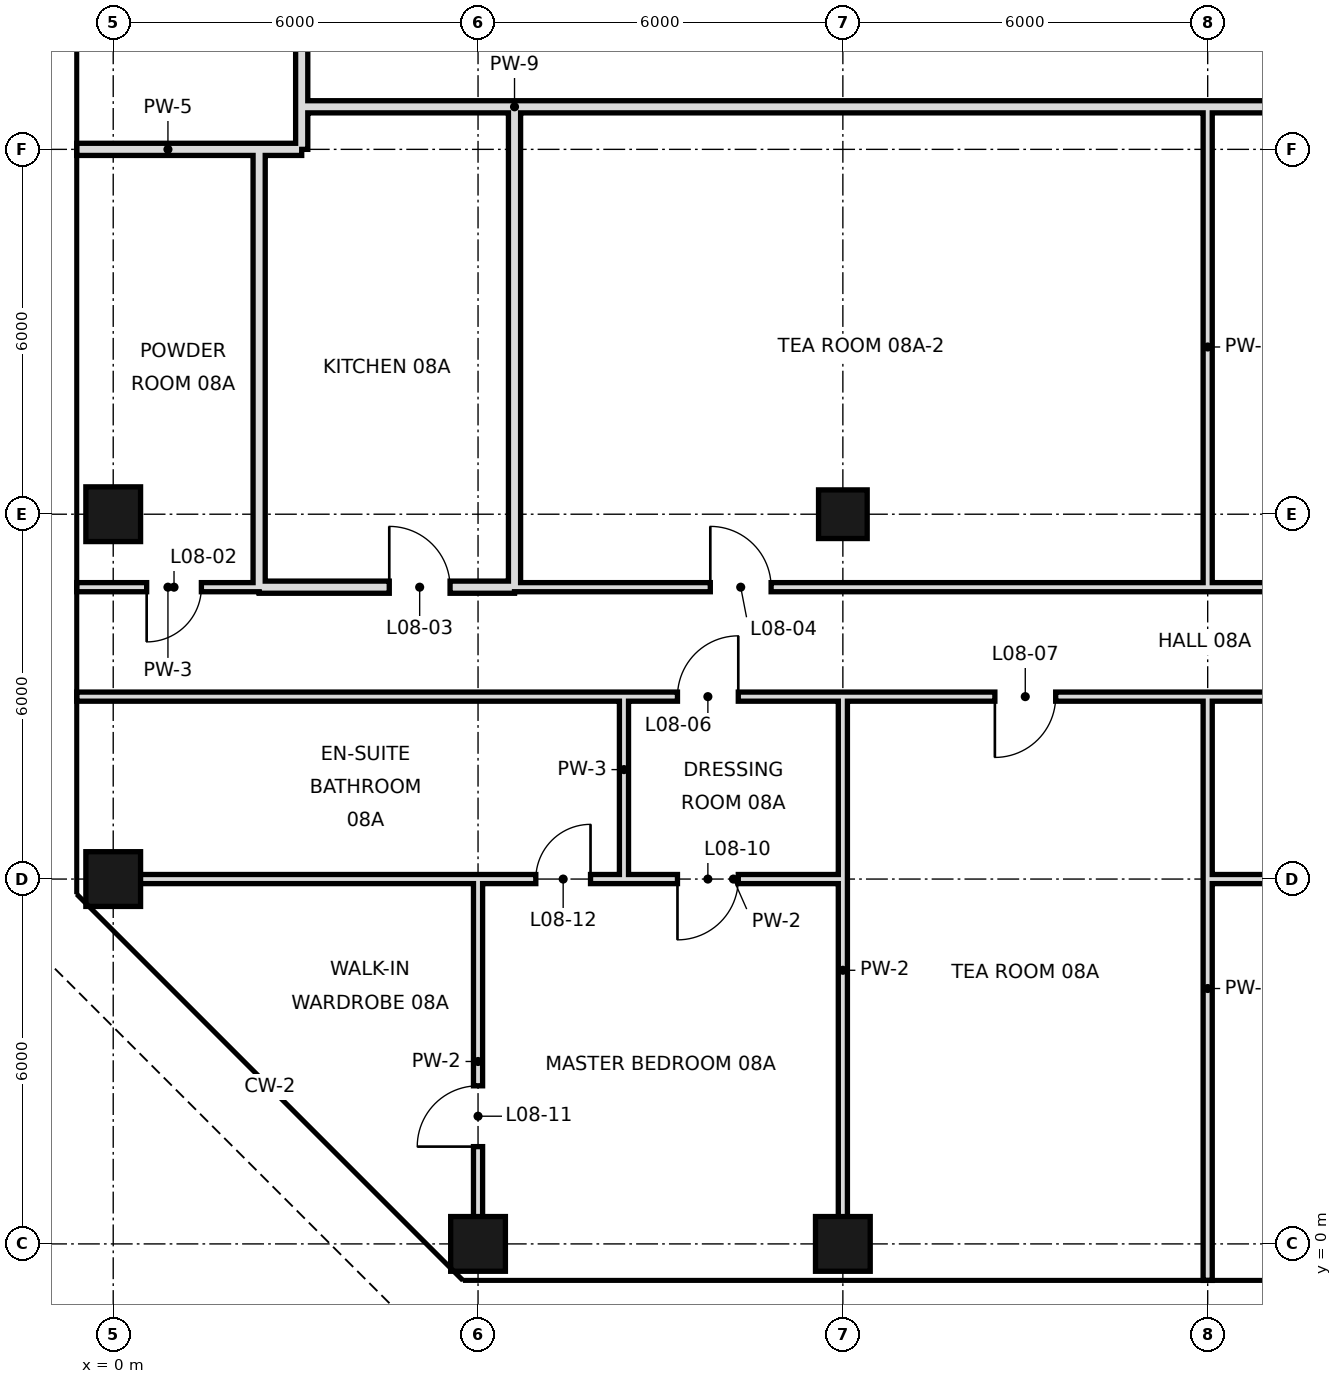
"""IFC4 building model, lengths in metres.
Left out: names, types, materials, properties, quantities, classifications, styles, units other than length and angle.
Written with IfcOpenShell. Run it as: python <this file> out.ifc"""

import sys

from ifc_helpers import new_model, si_unit, direction, frame, frame_2d, origin, origin_2d, place, context, subcontext, project, spatial, rectangle, hollow_rectangle, extrude, element, fill, save


model = new_model("IFC4")
c1 = context("Model", 3, precision=1e-05, world=origin(), true_north=direction((0.0, 1.0)))
c2 = subcontext(c1, "Body", "Model", "MODEL_VIEW")
j1 = project(units=[si_unit("LENGTHUNIT", "METRE"), si_unit("PLANEANGLEUNIT", "RADIAN")], contexts=[c1])
p1 = place(None, origin())
s1 = spatial("IfcSite", under=j1, at=p1, CompositionType="ELEMENT")
p2 = place(p1, origin())
s2 = spatial("IfcBuilding", under=s1, at=p2, CompositionType="ELEMENT")
p3 = place(p2, frame((0.0, 0.0, 49.8)))
s3 = spatial("IfcBuildingStorey", under=s2, at=p3, CompositionType="ELEMENT", Elevation=49.8)
for number, where, z_axis, x_axis in (
    (1, (0.0, 6.0, 0.0), (0.0, 0.0, 1.0), (1.0, 0.0, 0.0)),
    (2, (0.0, 12.0, 0.0), (0.0, 0.0, 1.0), (1.0, 0.0, 0.0)),
    (3, (6.0, 0.0, 0.0), (0.0, 0.0, 1.0), (1.0, 0.0, 0.0)),
    (4, (12.0, 0.0, 0.0), (0.0, 0.0, 1.0), (1.0, 0.0, 0.0)),
):
    element("IfcColumn", number, at=place(p3, frame(where, z_axis=z_axis, x_axis=x_axis)), inside=s3, PredefinedType="COLUMN", context=c2, shape_type="SweptSolid", body=[
        extrude(hollow_rectangle(XDim=0.9, YDim=0.9, WallThickness=0.045, at=origin_2d()), origin(), (0.0, 0.0, 1.0), 3.6),
    ])
p4 = place(p3, frame((12.0, 12.0, 0.0), z_axis=(0.0, 0.0, 1.0), x_axis=(1.0, 0.0, 0.0)))
e5 = element("IfcColumn", 5, at=p4, inside=s3, PredefinedType="COLUMN", context=c2, shape_type="SweptSolid", body=[
    extrude(hollow_rectangle(XDim=0.8, YDim=0.8, WallThickness=0.04, at=origin_2d()), origin(), (0.0, 0.0, 1.0), 3.6),
])
p5 = place(p3, frame((12.0, 0.0, 0.0), z_axis=(0.0, 0.0, 1.0), x_axis=(0.0, 1.0, 0.0)))
e6 = element("IfcWall", 6, at=p5, inside=s3, PredefinedType="PARTITIONING", context=c2, shape_type="SweptSolid", body=[
    extrude(rectangle(XDim=9.0, YDim=0.15, at=frame_2d((4.5, 0.0))), origin(), (0.0, 0.0, 1.0), 2.72),
])
p6 = place(p3, frame((18.0, -0.6, 0.0), z_axis=(0.0, 0.0, 1.0), x_axis=(0.0, 1.0, 0.0)))
e7 = element("IfcWall", 7, at=p6, inside=s3, PredefinedType="PARTITIONING", context=c2, shape_type="SweptSolid", body=[
    extrude(rectangle(XDim=9.6, YDim=0.15, at=frame_2d((4.8, 0.0))), origin(), (0.0, 0.0, 1.0), 2.72),
])
p7 = place(p3, frame((18.0, 10.8, 0.0), z_axis=(0.0, 0.0, 1.0), x_axis=(0.0, 1.0, 0.0)))
e8 = element("IfcWall", 8, at=p7, inside=s3, PredefinedType="PARTITIONING", context=c2, shape_type="SweptSolid", body=[
    extrude(rectangle(XDim=7.9, YDim=0.15, at=frame_2d((3.95, 0.0))), origin(), (0.0, 0.0, 1.0), 2.72),
])
p8 = place(p3, frame((2.4, 10.8, 0.0), z_axis=(0.0, 0.0, 1.0), x_axis=(0.0, 1.0, 0.0)))
e9 = element("IfcWall", 9, at=p8, inside=s3, PredefinedType="SOLIDWALL", context=c2, shape_type="SweptSolid", body=[
    extrude(rectangle(XDim=7.2, YDim=0.2, at=frame_2d((3.6, 0.0))), origin(), (0.0, 0.0, 1.0), 2.72),
])
p9 = place(p3, frame((3.1, 18.7, 0.0), z_axis=(0.0, 0.0, 1.0), x_axis=(0.0, 1.0, 0.0)))
e10 = element("IfcWall", 10, at=p9, inside=s3, PredefinedType="SOLIDWALL", context=c2, shape_type="SweptSolid", body=[
    extrude(rectangle(XDim=27.249, YDim=0.2, at=frame_2d((13.625, 0.0))), origin(), (0.0, 0.0, 1.0), 2.97),
])
p10 = place(p9, frame((17.54, 0.0, 0.0)))
e11 = element("IfcOpeningElement", 11, at=p10, cuts=e10, PredefinedType="OPENING", context=c2, shape_type="SweptSolid", body=[
    extrude(rectangle(XDim=1.2, YDim=2.4, at=frame_2d((0.6, 1.2))), frame((0.0, 0.11, 0.0), z_axis=(0.0, -1.0, 0.0), x_axis=(1.0, 0.0, 0.0)), (0.0, 0.0, 1.0), 0.22),
])
p11 = place(p3, frame((3.1, 18.0, 0.0), z_axis=(0.0, 0.0, 1.0), x_axis=(0.0, 1.0, 0.0)))
e12 = element("IfcWall", 12, at=p11, inside=s3, PredefinedType="SOLIDWALL", context=c2, shape_type="SweptSolid", body=[
    extrude(rectangle(XDim=0.7, YDim=0.2, at=frame_2d((0.35, 0.0))), origin(), (0.0, 0.0, 1.0), 2.97),
])
p12 = place(p3, frame((6.0, 0.0, 0.0), z_axis=(0.0, 0.0, 1.0), x_axis=(0.0, 1.0, 0.0)))
e13 = element("IfcWall", 13, at=p12, inside=s3, PredefinedType="PARTITIONING", context=c2, shape_type="SweptSolid", body=[
    extrude(rectangle(XDim=6.0, YDim=0.15, at=frame_2d((3.0, 0.0))), origin(), (0.0, 0.0, 1.0), 2.72),
])
p13 = place(p12, frame((1.6, 0.0, 0.0)))
e14 = element("IfcOpeningElement", 14, at=p13, cuts=e13, PredefinedType="OPENING", context=c2, shape_type="SweptSolid", body=[
    extrude(rectangle(XDim=1.0, YDim=2.4, at=frame_2d((0.5, 1.2))), frame((0.0, 0.085, 0.0), z_axis=(0.0, -1.0, 0.0), x_axis=(1.0, 0.0, 0.0)), (0.0, 0.0, 1.0), 0.17),
])
p14 = place(p3, frame((6.6, 10.8, 0.0), z_axis=(0.0, 0.0, 1.0), x_axis=(0.0, 1.0, 0.0)))
e15 = element("IfcWall", 15, at=p14, inside=s3, PredefinedType="SOLIDWALL", context=c2, shape_type="SweptSolid", body=[
    extrude(rectangle(XDim=7.9, YDim=0.2, at=frame_2d((3.95, 0.0))), origin(), (0.0, 0.0, 1.0), 2.72),
])
p15 = place(p3, frame((8.4, 6.0, 0.0), z_axis=(0.0, 0.0, 1.0), x_axis=(0.0, 1.0, 0.0)))
e16 = element("IfcWall", 16, at=p15, inside=s3, PredefinedType="PARTITIONING", context=c2, shape_type="SweptSolid", body=[
    extrude(rectangle(XDim=3.0, YDim=0.15, at=frame_2d((1.5, 0.0))), origin(), (0.0, 0.0, 1.0), 3.42),
])
p16 = place(p3, frame((2.4, 10.8, 0.0), z_axis=(0.0, 0.0, 1.0), x_axis=(1.0, 0.0, 0.0)))
e17 = element("IfcWall", 17, at=p16, inside=s3, PredefinedType="SOLIDWALL", context=c2, shape_type="SweptSolid", body=[
    extrude(rectangle(XDim=4.2, YDim=0.2, at=frame_2d((2.1, 0.0))), origin(), (0.0, 0.0, 1.0), 2.72),
])
p17 = place(p16, frame((2.14, 0.0, 0.0)))
e18 = element("IfcOpeningElement", 18, at=p17, cuts=e17, PredefinedType="OPENING", context=c2, shape_type="SweptSolid", body=[
    extrude(rectangle(XDim=1.0, YDim=2.4, at=frame_2d((0.5, 1.2))), frame((0.0, 0.11, 0.0), z_axis=(0.0, -1.0, 0.0), x_axis=(1.0, 0.0, 0.0)), (0.0, 0.0, 1.0), 0.22),
])
p18 = place(p3, frame((6.6, 10.8, 0.0), z_axis=(0.0, 0.0, 1.0), x_axis=(1.0, 0.0, 0.0)))
e19 = element("IfcWall", 19, at=p18, inside=s3, PredefinedType="PARTITIONING", context=c2, shape_type="SweptSolid", body=[
    extrude(rectangle(XDim=29.4, YDim=0.15, at=frame_2d((14.7, 0.0))), origin(), (0.0, 0.0, 1.0), 3.42),
])
p19 = place(p18, frame((26.8, 0.0, 0.0)))
e20 = element("IfcOpeningElement", 20, at=p19, cuts=e19, PredefinedType="OPENING", context=c2, shape_type="SweptSolid", body=[
    extrude(rectangle(XDim=1.0, YDim=2.4, at=frame_2d((0.5, 1.2))), frame((0.0, 0.085, 0.0), z_axis=(0.0, -1.0, 0.0), x_axis=(1.0, 0.0, 0.0)), (0.0, 0.0, 1.0), 0.17),
])
p20 = place(p18, frame((3.22, 0.0, 0.0)))
e21 = element("IfcOpeningElement", 21, at=p20, cuts=e19, PredefinedType="OPENING", context=c2, shape_type="SweptSolid", body=[
    extrude(rectangle(XDim=1.0, YDim=2.4, at=frame_2d((0.5, 1.2))), frame((0.0, 0.085, 0.0), z_axis=(0.0, -1.0, 0.0), x_axis=(1.0, 0.0, 0.0)), (0.0, 0.0, 1.0), 0.17),
])
p21 = place(p18, frame((14.8, 0.0, 0.0)))
e22 = element("IfcOpeningElement", 22, at=p21, cuts=e19, PredefinedType="OPENING", context=c2, shape_type="SweptSolid", body=[
    extrude(rectangle(XDim=1.0, YDim=2.4, at=frame_2d((0.5, 1.2))), frame((0.0, 0.085, 0.0), z_axis=(0.0, -1.0, 0.0), x_axis=(1.0, 0.0, 0.0)), (0.0, 0.0, 1.0), 0.17),
])
p22 = place(p3, frame((-0.6, 10.8, 0.0), z_axis=(0.0, 0.0, 1.0), x_axis=(1.0, 0.0, 0.0)))
e23 = element("IfcWall", 23, at=p22, inside=s3, PredefinedType="PARTITIONING", context=c2, shape_type="SweptSolid", body=[
    extrude(rectangle(XDim=3.0, YDim=0.15, at=frame_2d((1.5, 0.0))), origin(), (0.0, 0.0, 1.0), 3.42),
])
p23 = place(p22, frame((1.15, 0.0, 0.0)))
e24 = element("IfcOpeningElement", 24, at=p23, cuts=e23, PredefinedType="OPENING", context=c2, shape_type="SweptSolid", body=[
    extrude(rectangle(XDim=0.9, YDim=2.4, at=frame_2d((0.45, 1.2))), frame((0.0, 0.085, 0.0), z_axis=(0.0, -1.0, 0.0), x_axis=(1.0, 0.0, 0.0)), (0.0, 0.0, 1.0), 0.17),
])
p24 = place(p3, frame((-0.6, 18.0, 0.0), z_axis=(0.0, 0.0, 1.0), x_axis=(1.0, 0.0, 0.0)))
e25 = element("IfcWall", 25, at=p24, inside=s3, PredefinedType="SOLIDWALL", context=c2, shape_type="SweptSolid", body=[
    extrude(rectangle(XDim=3.0, YDim=0.2, at=frame_2d((1.5, 0.0))), origin(), (0.0, 0.0, 1.0), 2.72),
])
p25 = place(p3, frame((2.4, 18.0, 0.0), z_axis=(0.0, 0.0, 1.0), x_axis=(1.0, 0.0, 0.0)))
e26 = element("IfcWall", 26, at=p25, inside=s3, PredefinedType="SOLIDWALL", context=c2, shape_type="SweptSolid", body=[
    extrude(rectangle(XDim=0.7, YDim=0.2, at=frame_2d((0.35, 0.0))), origin(), (0.0, 0.0, 1.0), 2.97),
])
p26 = place(p3, frame((6.6, 18.7, 0.0), z_axis=(0.0, 0.0, 1.0), x_axis=(1.0, 0.0, 0.0)))
e27 = element("IfcWall", 27, at=p26, inside=s3, PredefinedType="SOLIDWALL", context=c2, shape_type="SweptSolid", body=[
    extrude(rectangle(XDim=38.3, YDim=0.2, at=frame_2d((19.15, 0.0))), origin(), (0.0, 0.0, 1.0), 2.72),
])
p27 = place(p26, frame((25.8, 0.0, 0.0)))
e28 = element("IfcOpeningElement", 28, at=p27, cuts=e27, PredefinedType="OPENING", context=c2, shape_type="SweptSolid", body=[
    extrude(rectangle(XDim=1.2, YDim=2.4, at=frame_2d((0.6, 1.2))), frame((0.0, 0.11, 0.0), z_axis=(0.0, -1.0, 0.0), x_axis=(1.0, 0.0, 0.0)), (0.0, 0.0, 1.0), 0.22),
])
p28 = place(p26, frame((33.34, 0.0, 0.0)))
e29 = element("IfcOpeningElement", 29, at=p28, cuts=e27, PredefinedType="OPENING", context=c2, shape_type="SweptSolid", body=[
    extrude(rectangle(XDim=1.2, YDim=2.4, at=frame_2d((0.6, 1.2))), frame((0.0, 0.11, 0.0), z_axis=(0.0, -1.0, 0.0), x_axis=(1.0, 0.0, 0.0)), (0.0, 0.0, 1.0), 0.22),
])
p29 = place(p3, frame((3.1, 18.7, 0.0), z_axis=(0.0, 0.0, 1.0), x_axis=(1.0, 0.0, 0.0)))
e30 = element("IfcWall", 30, at=p29, inside=s3, PredefinedType="SOLIDWALL", context=c2, shape_type="SweptSolid", body=[
    extrude(rectangle(XDim=3.5, YDim=0.2, at=frame_2d((1.75, 0.0))), origin(), (0.0, 0.0, 1.0), 2.72),
])
p30 = place(p3, frame((8.4, 6.0, 0.0), z_axis=(0.0, 0.0, 1.0), x_axis=(1.0, 0.0, 0.0)))
e31 = element("IfcWall", 31, at=p30, inside=s3, PredefinedType="PARTITIONING", context=c2, shape_type="SweptSolid", body=[
    extrude(rectangle(XDim=3.6, YDim=0.15, at=frame_2d((1.8, 0.0))), origin(), (0.0, 0.0, 1.0), 2.97),
])
p31 = place(p30, frame((0.88, 0.0, 0.0)))
e32 = element("IfcOpeningElement", 32, at=p31, cuts=e31, PredefinedType="OPENING", context=c2, shape_type="SweptSolid", body=[
    extrude(rectangle(XDim=1.0, YDim=2.4, at=frame_2d((0.5, 1.2))), frame((0.0, 0.085, 0.0), z_axis=(0.0, -1.0, 0.0), x_axis=(1.0, 0.0, 0.0)), (0.0, 0.0, 1.0), 0.17),
])
p32 = place(p3, frame((18.0, 6.0, 0.0), z_axis=(0.0, 0.0, 1.0), x_axis=(1.0, 0.0, 0.0)))
e33 = element("IfcWall", 33, at=p32, inside=s3, PredefinedType="PARTITIONING", context=c2, shape_type="SweptSolid", body=[
    extrude(rectangle(XDim=12.0, YDim=0.15, at=frame_2d((6.0, 0.0))), origin(), (0.0, 0.0, 1.0), 2.97),
])
p33 = place(p32, frame((9.95, 0.0, 0.0)))
e34 = element("IfcOpeningElement", 34, at=p33, cuts=e33, PredefinedType="OPENING", context=c2, shape_type="SweptSolid", body=[
    extrude(rectangle(XDim=1.8, YDim=2.4, at=frame_2d((0.9, 1.2))), frame((0.0, 0.085, 0.0), z_axis=(0.0, -1.0, 0.0), x_axis=(1.0, 0.0, 0.0)), (0.0, 0.0, 1.0), 0.17),
])
p34 = place(p3, frame((0.0, 6.0, 0.0), z_axis=(0.0, 0.0, 1.0), x_axis=(1.0, 0.0, 0.0)))
e35 = element("IfcWall", 35, at=p34, inside=s3, PredefinedType="PARTITIONING", context=c2, shape_type="SweptSolid", body=[
    extrude(rectangle(XDim=8.4, YDim=0.15, at=frame_2d((4.2, 0.0))), origin(), (0.0, 0.0, 1.0), 2.97),
])
p35 = place(p34, frame((6.95, 0.0, 0.0)))
e36 = element("IfcOpeningElement", 36, at=p35, cuts=e35, PredefinedType="OPENING", context=c2, shape_type="SweptSolid", body=[
    extrude(rectangle(XDim=0.9, YDim=2.4, at=frame_2d((0.45, 1.2))), frame((0.0, 0.085, 0.0), z_axis=(0.0, -1.0, 0.0), x_axis=(1.0, 0.0, 0.0)), (0.0, 0.0, 1.0), 0.17),
])
p36 = place(p3, frame((8.4, 9.0, 0.0), z_axis=(0.0, 0.0, 1.0), x_axis=(1.0, 0.0, 0.0)))
e37 = element("IfcWall", 37, at=p36, inside=s3, PredefinedType="PARTITIONING", context=c2, shape_type="SweptSolid", body=[
    extrude(rectangle(XDim=36.0, YDim=0.15, at=frame_2d((18.0, 0.0))), origin(), (0.0, 0.0, 1.0), 3.42),
])
p37 = place(p36, frame((0.88, 0.0, 0.0)))
e38 = element("IfcOpeningElement", 38, at=p37, cuts=e37, PredefinedType="OPENING", context=c2, shape_type="SweptSolid", body=[
    extrude(rectangle(XDim=1.0, YDim=2.4, at=frame_2d((0.5, 1.2))), frame((0.0, 0.085, 0.0), z_axis=(0.0, -1.0, 0.0), x_axis=(1.0, 0.0, 0.0)), (0.0, 0.0, 1.0), 0.17),
])
p38 = place(p36, frame((6.1, 0.0, 0.0)))
e39 = element("IfcOpeningElement", 39, at=p38, cuts=e37, PredefinedType="OPENING", context=c2, shape_type="SweptSolid", body=[
    extrude(rectangle(XDim=1.0, YDim=2.4, at=frame_2d((0.5, 1.2))), frame((0.0, 0.085, 0.0), z_axis=(0.0, -1.0, 0.0), x_axis=(1.0, 0.0, 0.0)), (0.0, 0.0, 1.0), 0.17),
])
p39 = place(p36, frame((16.64, 0.0, 0.0)))
e40 = element("IfcOpeningElement", 40, at=p39, cuts=e37, PredefinedType="OPENING", context=c2, shape_type="SweptSolid", body=[
    extrude(rectangle(XDim=1.8, YDim=2.4, at=frame_2d((0.9, 1.2))), frame((0.0, 0.085, 0.0), z_axis=(0.0, -1.0, 0.0), x_axis=(1.0, 0.0, 0.0)), (0.0, 0.0, 1.0), 0.17),
])
p40 = place(p36, frame((23.7, 0.0, 0.0)))
e41 = element("IfcOpeningElement", 41, at=p40, cuts=e37, PredefinedType="OPENING", context=c2, shape_type="SweptSolid", body=[
    extrude(rectangle(XDim=1.8, YDim=2.4, at=frame_2d((0.9, 1.2))), frame((0.0, 0.085, 0.0), z_axis=(0.0, -1.0, 0.0), x_axis=(1.0, 0.0, 0.0)), (0.0, 0.0, 1.0), 0.17),
])
p41 = place(p36, frame((30.1, 0.0, 0.0)))
e42 = element("IfcOpeningElement", 42, at=p41, cuts=e37, PredefinedType="OPENING", context=c2, shape_type="SweptSolid", body=[
    extrude(rectangle(XDim=1.0, YDim=2.4, at=frame_2d((0.5, 1.2))), frame((0.0, 0.085, 0.0), z_axis=(0.0, -1.0, 0.0), x_axis=(1.0, 0.0, 0.0)), (0.0, 0.0, 1.0), 0.17),
])
p42 = place(p36, frame((34.12, 0.0, 0.0)))
e43 = element("IfcOpeningElement", 43, at=p42, cuts=e37, PredefinedType="OPENING", context=c2, shape_type="SweptSolid", body=[
    extrude(rectangle(XDim=1.0, YDim=2.4, at=frame_2d((0.5, 1.2))), frame((0.0, 0.085, 0.0), z_axis=(0.0, -1.0, 0.0), x_axis=(1.0, 0.0, 0.0)), (0.0, 0.0, 1.0), 0.17),
])
p43 = place(p3, frame((-0.6, 9.0, 0.0), z_axis=(0.0, 0.0, 1.0), x_axis=(1.0, 0.0, 0.0)))
e44 = element("IfcWall", 44, at=p43, inside=s3, PredefinedType="PARTITIONING", context=c2, shape_type="SweptSolid", body=[
    extrude(rectangle(XDim=9.0, YDim=0.15, at=frame_2d((4.5, 0.0))), origin(), (0.0, 0.0, 1.0), 3.42),
])
p44 = place(p23, frame((0.9, 0.0, 0.0), z_axis=(0.0, 0.0, 1.0), x_axis=(-1.0, 0.0, 0.0)))
e45 = element("IfcDoor", 45, at=p44, inside=s3, OperationType="SINGLE_SWING_RIGHT", PredefinedType="DOOR", context=c2, shape_type="SweptSolid", body=[
    extrude(rectangle(XDim=0.9, YDim=2.4, at=frame_2d((0.45, 1.2))), frame((0.0, 0.025, 0.0), z_axis=(0.0, -1.0, 0.0), x_axis=(1.0, 0.0, 0.0)), (0.0, 0.0, 1.0), 0.05),
])
fill(e24, e45)
p45 = place(p17, origin())
e46 = element("IfcDoor", 46, at=p45, inside=s3, OperationType="SINGLE_SWING_LEFT", PredefinedType="DOOR", context=c2, shape_type="SweptSolid", body=[
    extrude(rectangle(XDim=1.0, YDim=2.4, at=frame_2d((0.5, 1.2))), frame((0.0, 0.025, 0.0), z_axis=(0.0, -1.0, 0.0), x_axis=(1.0, 0.0, 0.0)), (0.0, 0.0, 1.0), 0.05),
])
fill(e18, e46)
p46 = place(p20, origin())
e47 = element("IfcDoor", 47, at=p46, inside=s3, OperationType="SINGLE_SWING_LEFT", PredefinedType="DOOR", context=c2, shape_type="SweptSolid", body=[
    extrude(rectangle(XDim=1.0, YDim=2.4, at=frame_2d((0.5, 1.2))), frame((0.0, 0.025, 0.0), z_axis=(0.0, -1.0, 0.0), x_axis=(1.0, 0.0, 0.0)), (0.0, 0.0, 1.0), 0.05),
])
fill(e21, e47)
p47 = place(p37, frame((1.0, 0.0, 0.0), z_axis=(0.0, 0.0, 1.0), x_axis=(-1.0, 0.0, 0.0)))
e48 = element("IfcDoor", 48, at=p47, inside=s3, OperationType="SINGLE_SWING_LEFT", PredefinedType="DOOR", context=c2, shape_type="SweptSolid", body=[
    extrude(rectangle(XDim=1.0, YDim=2.4, at=frame_2d((0.5, 1.2))), frame((0.0, 0.025, 0.0), z_axis=(0.0, -1.0, 0.0), x_axis=(1.0, 0.0, 0.0)), (0.0, 0.0, 1.0), 0.05),
])
fill(e38, e48)
p48 = place(p38, frame((1.0, 0.0, 0.0), z_axis=(0.0, 0.0, 1.0), x_axis=(-1.0, 0.0, 0.0)))
e49 = element("IfcDoor", 49, at=p48, inside=s3, OperationType="SINGLE_SWING_RIGHT", PredefinedType="DOOR", context=c2, shape_type="SweptSolid", body=[
    extrude(rectangle(XDim=1.0, YDim=2.4, at=frame_2d((0.5, 1.2))), frame((0.0, 0.025, 0.0), z_axis=(0.0, -1.0, 0.0), x_axis=(1.0, 0.0, 0.0)), (0.0, 0.0, 1.0), 0.05),
])
fill(e39, e49)
p49 = place(p31, frame((1.0, 0.0, 0.0), z_axis=(0.0, 0.0, 1.0), x_axis=(-1.0, 0.0, 0.0)))
e50 = element("IfcDoor", 50, at=p49, inside=s3, OperationType="SINGLE_SWING_RIGHT", PredefinedType="DOOR", context=c2, shape_type="SweptSolid", body=[
    extrude(rectangle(XDim=1.0, YDim=2.4, at=frame_2d((0.5, 1.2))), frame((0.0, 0.025, 0.0), z_axis=(0.0, -1.0, 0.0), x_axis=(1.0, 0.0, 0.0)), (0.0, 0.0, 1.0), 0.05),
])
fill(e32, e50)
p50 = place(p13, origin())
e51 = element("IfcDoor", 51, at=p50, inside=s3, OperationType="SINGLE_SWING_LEFT", PredefinedType="DOOR", context=c2, shape_type="SweptSolid", body=[
    extrude(rectangle(XDim=1.0, YDim=2.4, at=frame_2d((0.5, 1.2))), frame((0.0, 0.025, 0.0), z_axis=(0.0, -1.0, 0.0), x_axis=(1.0, 0.0, 0.0)), (0.0, 0.0, 1.0), 0.05),
])
fill(e14, e51)
p51 = place(p35, frame((0.9, 0.0, 0.0), z_axis=(0.0, 0.0, 1.0), x_axis=(-1.0, 0.0, 0.0)))
e52 = element("IfcDoor", 52, at=p51, inside=s3, OperationType="SINGLE_SWING_LEFT", PredefinedType="DOOR", context=c2, shape_type="SweptSolid", body=[
    extrude(rectangle(XDim=0.9, YDim=2.4, at=frame_2d((0.45, 1.2))), frame((0.0, 0.025, 0.0), z_axis=(0.0, -1.0, 0.0), x_axis=(1.0, 0.0, 0.0)), (0.0, 0.0, 1.0), 0.05),
])
fill(e36, e52)
save(model, sys.argv[1])
